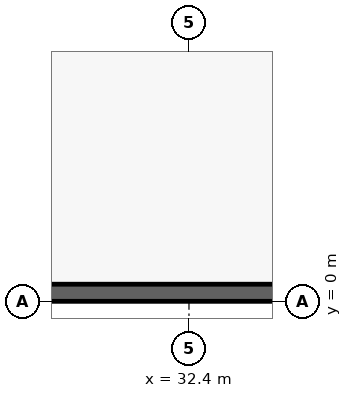
"""IFC4 building model, lengths in metres.
Left out: names, types, materials, properties, quantities, classifications, styles, units other than length and angle.
Written with IfcOpenShell. Run it as: python <this file> out.ifc"""

import sys

from ifc_helpers import new_model, si_unit, direction, frame, frame_2d, origin, place, context, subcontext, project, spatial, rectangle, extrude, element, save


model = new_model("IFC4")
c1 = context("Model", 3, precision=1e-05, world=origin(), true_north=direction((0.0, 1.0)))
c2 = subcontext(c1, "Body", "Model", "MODEL_VIEW")
j1 = project(units=[si_unit("LENGTHUNIT", "METRE"), si_unit("PLANEANGLEUNIT", "RADIAN")], contexts=[c1])
p1 = place(None, origin())
s1 = spatial("IfcSite", under=j1, at=p1, CompositionType="ELEMENT")
p2 = place(p1, origin())
s2 = spatial("IfcBuilding", under=s1, at=p2, CompositionType="ELEMENT")
p3 = place(p2, frame((0.0, 0.0, -10.8)))
s3 = spatial("IfcBuildingStorey", under=s2, at=p3, CompositionType="ELEMENT", Elevation=-10.8)
p4 = place(p3, frame((0.225, 0.225, 0.0), z_axis=(0.0, 0.0, 1.0), x_axis=(1.0, 0.0, 0.0)))
e1 = element("IfcWall", 1, at=p4, inside=s3, PredefinedType="USERDEFINED", context=c2, shape_type="SweptSolid", body=[
    extrude(rectangle(XDim=64.35, YDim=0.45, at=frame_2d((32.175, 0.0))), origin(), (0.0, 0.0, 1.0), 3.238),
])
save(model, sys.argv[1])
